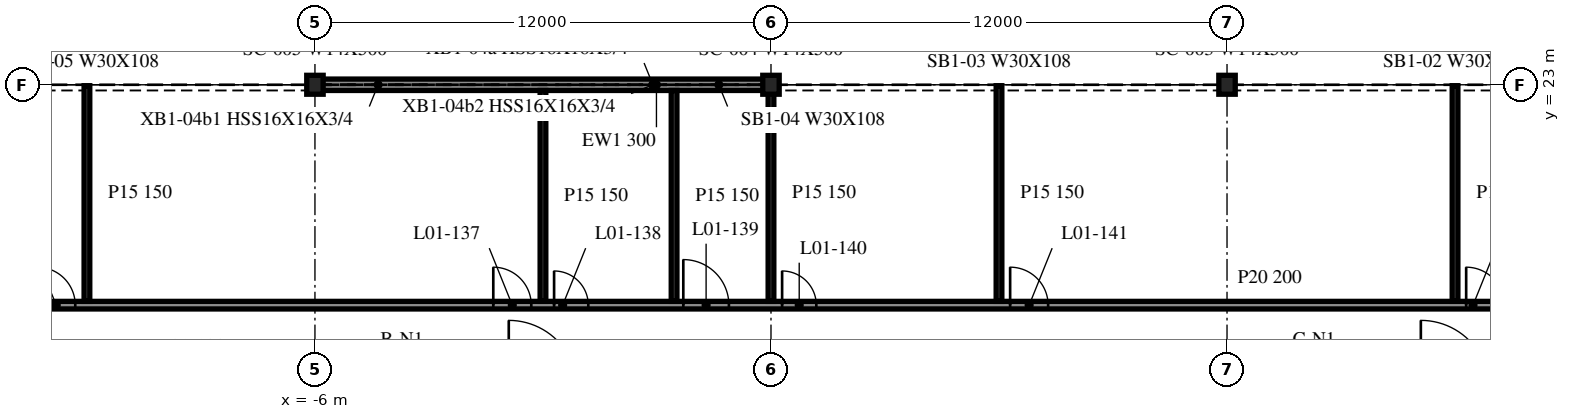
"""IFC4 building model, lengths in metres.
Left out: names, types, materials, properties, quantities, classifications, styles, units other than length and angle.
Written with IfcOpenShell. Run it as: python <this file> out.ifc"""

import sys

from ifc_helpers import new_model, si_unit, direction, frame, frame_2d, origin, origin_2d, place, context, subcontext, project, spatial, rectangle, i_section, extrude, element, fill, save


model = new_model("IFC4")
c1 = context("Model", 3, precision=1e-05, world=origin(), true_north=direction((0.0, 1.0)))
c2 = subcontext(c1, "Body", "Model", "MODEL_VIEW")
j1 = project(units=[si_unit("LENGTHUNIT", "METRE"), si_unit("PLANEANGLEUNIT", "RADIAN")], contexts=[c1])
p1 = place(None, origin())
s1 = spatial("IfcSite", under=j1, at=p1, CompositionType="ELEMENT")
p2 = place(p1, origin())
s2 = spatial("IfcBuilding", under=s1, at=p2, CompositionType="ELEMENT")
p3 = place(p2, frame((0.0, 0.0, 7.2)))
s3 = spatial("IfcBuildingStorey", under=s2, at=p3, CompositionType="ELEMENT", Elevation=7.2)
for number, where, z_axis, x_axis in (
    (1, (18.0, 23.0, -0.34), (0.0, 0.0, 1.0), (1.0, 0.0, 0.0)),
    (2, (6.0, 23.0, -0.34), (0.0, 0.0, 1.0), (1.0, 0.0, 0.0)),
    (3, (-6.0, 23.0, -0.34), (0.0, 0.0, 1.0), (1.0, 0.0, 0.0)),
):
    element("IfcColumn", number, at=place(p3, frame(where, z_axis=z_axis, x_axis=x_axis)), inside=s3, PredefinedType="COLUMN", context=c2, shape_type="SweptSolid", body=[
        extrude(i_section(OverallWidth=0.432, OverallDepth=0.498, WebThickness=0.056, FlangeThickness=0.089, at=origin_2d()), origin(), (0.0, 0.0, 1.0), 4.3),
    ])
p4 = place(p3, frame((5.972, 23.0, 0.0), z_axis=(0.0, 0.0, 1.0), x_axis=(-1.0, 0.0, 0.0)))
e4 = element("IfcWall", 4, at=p4, inside=s3, PredefinedType="NOTDEFINED", context=c2, shape_type="SweptSolid", body=[
    extrude(rectangle(XDim=11.944, YDim=0.3, at=frame_2d((5.972, 0.0))), origin(), (0.0, 0.0, 1.0), 3.203),
])
p5 = place(p3, frame((-47.807, 17.2, 0.0), z_axis=(0.0, 0.0, 1.0), x_axis=(1.0, 0.0, 0.0)))
e5 = element("IfcWall", 5, at=p5, inside=s3, PredefinedType="PARTITIONING", context=c2, shape_type="SweptSolid", body=[
    extrude(rectangle(XDim=95.615, YDim=0.2, at=frame_2d((47.807, 0.0))), origin(), (0.0, 0.0, 1.0), 3.96),
])
p6 = place(p5, frame((4.5, 0.0, 0.0)))
e6 = element("IfcOpeningElement", 6, at=p6, cuts=e5, PredefinedType="OPENING", context=c2, shape_type="SweptSolid", body=[
    extrude(rectangle(XDim=1.0, YDim=2.1, at=frame_2d((0.5, 1.05))), frame((0.0, 0.11, 0.0), z_axis=(0.0, -1.0, 0.0), x_axis=(1.0, 0.0, 0.0)), (0.0, 0.0, 1.0), 0.22),
])
p7 = place(p5, frame((10.9, 0.0, 0.0)))
e7 = element("IfcOpeningElement", 7, at=p7, cuts=e5, PredefinedType="OPENING", context=c2, shape_type="SweptSolid", body=[
    extrude(rectangle(XDim=1.0, YDim=2.1, at=frame_2d((0.5, 1.05))), frame((0.0, 0.11, 0.0), z_axis=(0.0, -1.0, 0.0), x_axis=(1.0, 0.0, 0.0)), (0.0, 0.0, 1.0), 0.22),
])
p8 = place(p5, frame((22.7, 0.0, 0.0)))
e8 = element("IfcOpeningElement", 8, at=p8, cuts=e5, PredefinedType="OPENING", context=c2, shape_type="SweptSolid", body=[
    extrude(rectangle(XDim=0.9, YDim=2.1, at=frame_2d((0.45, 1.05))), frame((0.0, 0.11, 0.0), z_axis=(0.0, -1.0, 0.0), x_axis=(1.0, 0.0, 0.0)), (0.0, 0.0, 1.0), 0.22),
])
p9 = place(p5, frame((25.7, 0.0, 0.0)))
e9 = element("IfcOpeningElement", 9, at=p9, cuts=e5, PredefinedType="OPENING", context=c2, shape_type="SweptSolid", body=[
    extrude(rectangle(XDim=1.2, YDim=2.1, at=frame_2d((0.6, 1.05))), frame((0.0, 0.11, 0.0), z_axis=(0.0, -1.0, 0.0), x_axis=(1.0, 0.0, 0.0)), (0.0, 0.0, 1.0), 0.22),
])
p10 = place(p5, frame((28.7, 0.0, 0.0)))
e10 = element("IfcOpeningElement", 10, at=p10, cuts=e5, PredefinedType="OPENING", context=c2, shape_type="SweptSolid", body=[
    extrude(rectangle(XDim=0.9, YDim=2.1, at=frame_2d((0.45, 1.05))), frame((0.0, 0.11, 0.0), z_axis=(0.0, -1.0, 0.0), x_axis=(1.0, 0.0, 0.0)), (0.0, 0.0, 1.0), 0.22),
])
p11 = place(p5, frame((34.5, 0.0, 0.0)))
e11 = element("IfcOpeningElement", 11, at=p11, cuts=e5, PredefinedType="OPENING", context=c2, shape_type="SweptSolid", body=[
    extrude(rectangle(XDim=1.0, YDim=2.1, at=frame_2d((0.5, 1.05))), frame((0.0, 0.11, 0.0), z_axis=(0.0, -1.0, 0.0), x_axis=(1.0, 0.0, 0.0)), (0.0, 0.0, 1.0), 0.22),
])
p12 = place(p5, frame((46.5, 0.0, 0.0)))
e12 = element("IfcOpeningElement", 12, at=p12, cuts=e5, PredefinedType="OPENING", context=c2, shape_type="SweptSolid", body=[
    extrude(rectangle(XDim=1.0, YDim=2.1, at=frame_2d((0.5, 1.05))), frame((0.0, 0.11, 0.0), z_axis=(0.0, -1.0, 0.0), x_axis=(1.0, 0.0, 0.0)), (0.0, 0.0, 1.0), 0.22),
])
p13 = place(p5, frame((48.1, 0.0, 0.0)))
e13 = element("IfcOpeningElement", 13, at=p13, cuts=e5, PredefinedType="OPENING", context=c2, shape_type="SweptSolid", body=[
    extrude(rectangle(XDim=0.9, YDim=2.1, at=frame_2d((0.45, 1.05))), frame((0.0, 0.11, 0.0), z_axis=(0.0, -1.0, 0.0), x_axis=(1.0, 0.0, 0.0)), (0.0, 0.0, 1.0), 0.22),
])
p14 = place(p5, frame((51.5, 0.0, 0.0)))
e14 = element("IfcOpeningElement", 14, at=p14, cuts=e5, PredefinedType="OPENING", context=c2, shape_type="SweptSolid", body=[
    extrude(rectangle(XDim=1.2, YDim=2.1, at=frame_2d((0.6, 1.05))), frame((0.0, 0.11, 0.0), z_axis=(0.0, -1.0, 0.0), x_axis=(1.0, 0.0, 0.0)), (0.0, 0.0, 1.0), 0.22),
])
p15 = place(p5, frame((54.1, 0.0, 0.0)))
e15 = element("IfcOpeningElement", 15, at=p15, cuts=e5, PredefinedType="OPENING", context=c2, shape_type="SweptSolid", body=[
    extrude(rectangle(XDim=0.9, YDim=2.1, at=frame_2d((0.45, 1.05))), frame((0.0, 0.11, 0.0), z_axis=(0.0, -1.0, 0.0), x_axis=(1.0, 0.0, 0.0)), (0.0, 0.0, 1.0), 0.22),
])
p16 = place(p5, frame((60.1, 0.0, 0.0)))
e16 = element("IfcOpeningElement", 16, at=p16, cuts=e5, PredefinedType="OPENING", context=c2, shape_type="SweptSolid", body=[
    extrude(rectangle(XDim=1.0, YDim=2.1, at=frame_2d((0.5, 1.05))), frame((0.0, 0.11, 0.0), z_axis=(0.0, -1.0, 0.0), x_axis=(1.0, 0.0, 0.0)), (0.0, 0.0, 1.0), 0.22),
])
p17 = place(p5, frame((72.1, 0.0, 0.0)))
e17 = element("IfcOpeningElement", 17, at=p17, cuts=e5, PredefinedType="OPENING", context=c2, shape_type="SweptSolid", body=[
    extrude(rectangle(XDim=1.0, YDim=2.1, at=frame_2d((0.5, 1.05))), frame((0.0, 0.11, 0.0), z_axis=(0.0, -1.0, 0.0), x_axis=(1.0, 0.0, 0.0)), (0.0, 0.0, 1.0), 0.22),
])
p18 = place(p5, frame((75.5, 0.0, 0.0)))
e18 = element("IfcOpeningElement", 18, at=p18, cuts=e5, PredefinedType="OPENING", context=c2, shape_type="SweptSolid", body=[
    extrude(rectangle(XDim=0.9, YDim=2.1, at=frame_2d((0.45, 1.05))), frame((0.0, 0.11, 0.0), z_axis=(0.0, -1.0, 0.0), x_axis=(1.0, 0.0, 0.0)), (0.0, 0.0, 1.0), 0.22),
])
p19 = place(p5, frame((78.1, 0.0, 0.0)))
e19 = element("IfcOpeningElement", 19, at=p19, cuts=e5, PredefinedType="OPENING", context=c2, shape_type="SweptSolid", body=[
    extrude(rectangle(XDim=1.2, YDim=2.1, at=frame_2d((0.6, 1.05))), frame((0.0, 0.11, 0.0), z_axis=(0.0, -1.0, 0.0), x_axis=(1.0, 0.0, 0.0)), (0.0, 0.0, 1.0), 0.22),
])
p20 = place(p5, frame((84.1, 0.0, 0.0)))
e20 = element("IfcOpeningElement", 20, at=p20, cuts=e5, PredefinedType="OPENING", context=c2, shape_type="SweptSolid", body=[
    extrude(rectangle(XDim=0.9, YDim=2.1, at=frame_2d((0.45, 1.05))), frame((0.0, 0.11, 0.0), z_axis=(0.0, -1.0, 0.0), x_axis=(1.0, 0.0, 0.0)), (0.0, 0.0, 1.0), 0.22),
])
p21 = place(p3, frame((-12.0, 17.3, 0.0), z_axis=(0.0, 0.0, 1.0), x_axis=(0.0, 1.0, 0.0)))
e21 = element("IfcWall", 21, at=p21, inside=s3, PredefinedType="PARTITIONING", context=c2, shape_type="SweptSolid", body=[
    extrude(rectangle(XDim=5.675, YDim=0.15, at=frame_2d((2.837, 0.0))), origin(), (0.0, 0.0, 1.0), 3.96),
])
for number, where, z_axis, x_axis in (
    (22, (0.0, 17.3, 0.0), (0.0, 0.0, 1.0), (0.0, 1.0, 0.0)),
    (23, (3.45, 17.3, 0.0), (0.0, 0.0, 1.0), (0.0, 1.0, 0.0)),
):
    element("IfcWall", number, at=place(p3, frame(where, z_axis=z_axis, x_axis=x_axis)), inside=s3, PredefinedType="PARTITIONING", context=c2, shape_type="SweptSolid", body=[
        extrude(rectangle(XDim=5.55, YDim=0.15, at=frame_2d((2.775, 0.0))), origin(), (0.0, 0.0, 1.0), 3.96),
    ])
for number, where, z_axis, x_axis in (
    (24, (6.0, 17.3, 0.0), (0.0, 0.0, 1.0), (0.0, 1.0, 0.0)),
    (25, (12.0, 17.3, 0.0), (0.0, 0.0, 1.0), (0.0, 1.0, 0.0)),
    (26, (24.0, 17.3, 0.0), (0.0, 0.0, 1.0), (0.0, 1.0, 0.0)),
):
    element("IfcWall", number, at=place(p3, frame(where, z_axis=z_axis, x_axis=x_axis)), inside=s3, PredefinedType="PARTITIONING", context=c2, shape_type="SweptSolid", body=[
        extrude(rectangle(XDim=5.675, YDim=0.15, at=frame_2d((2.837, 0.0))), origin(), (0.0, 0.0, 1.0), 3.96),
    ])
p22 = place(p11, origin())
e27 = element("IfcDoor", 27, at=p22, inside=s3, OperationType="SINGLE_SWING_LEFT", PredefinedType="DOOR", context=c2, shape_type="SweptSolid", body=[
    extrude(rectangle(XDim=1.0, YDim=2.1, at=frame_2d((0.5, 1.05))), frame((0.0, 0.025, 0.0), z_axis=(0.0, -1.0, 0.0), x_axis=(1.0, 0.0, 0.0)), (0.0, 0.0, 1.0), 0.05),
])
fill(e11, e27)
p23 = place(p12, origin())
e28 = element("IfcDoor", 28, at=p23, inside=s3, OperationType="SINGLE_SWING_LEFT", PredefinedType="DOOR", context=c2, shape_type="SweptSolid", body=[
    extrude(rectangle(XDim=1.0, YDim=2.1, at=frame_2d((0.5, 1.05))), frame((0.0, 0.025, 0.0), z_axis=(0.0, -1.0, 0.0), x_axis=(1.0, 0.0, 0.0)), (0.0, 0.0, 1.0), 0.05),
])
fill(e12, e28)
p24 = place(p13, origin())
e29 = element("IfcDoor", 29, at=p24, inside=s3, OperationType="SINGLE_SWING_RIGHT", PredefinedType="DOOR", context=c2, shape_type="SweptSolid", body=[
    extrude(rectangle(XDim=0.9, YDim=2.1, at=frame_2d((0.45, 1.05))), frame((0.0, 0.025, 0.0), z_axis=(0.0, -1.0, 0.0), x_axis=(1.0, 0.0, 0.0)), (0.0, 0.0, 1.0), 0.05),
])
fill(e13, e29)
p25 = place(p14, origin())
e30 = element("IfcDoor", 30, at=p25, inside=s3, OperationType="SINGLE_SWING_RIGHT", PredefinedType="DOOR", context=c2, shape_type="SweptSolid", body=[
    extrude(rectangle(XDim=1.2, YDim=2.1, at=frame_2d((0.6, 1.05))), frame((0.0, 0.025, 0.0), z_axis=(0.0, -1.0, 0.0), x_axis=(1.0, 0.0, 0.0)), (0.0, 0.0, 1.0), 0.05),
])
fill(e14, e30)
p26 = place(p15, origin())
e31 = element("IfcDoor", 31, at=p26, inside=s3, OperationType="SINGLE_SWING_RIGHT", PredefinedType="DOOR", context=c2, shape_type="SweptSolid", body=[
    extrude(rectangle(XDim=0.9, YDim=2.1, at=frame_2d((0.45, 1.05))), frame((0.0, 0.025, 0.0), z_axis=(0.0, -1.0, 0.0), x_axis=(1.0, 0.0, 0.0)), (0.0, 0.0, 1.0), 0.05),
])
fill(e15, e31)
p27 = place(p16, origin())
e32 = element("IfcDoor", 32, at=p27, inside=s3, OperationType="SINGLE_SWING_RIGHT", PredefinedType="DOOR", context=c2, shape_type="SweptSolid", body=[
    extrude(rectangle(XDim=1.0, YDim=2.1, at=frame_2d((0.5, 1.05))), frame((0.0, 0.025, 0.0), z_axis=(0.0, -1.0, 0.0), x_axis=(1.0, 0.0, 0.0)), (0.0, 0.0, 1.0), 0.05),
])
fill(e16, e32)
p28 = place(p17, origin())
e33 = element("IfcDoor", 33, at=p28, inside=s3, OperationType="SINGLE_SWING_RIGHT", PredefinedType="DOOR", context=c2, shape_type="SweptSolid", body=[
    extrude(rectangle(XDim=1.0, YDim=2.1, at=frame_2d((0.5, 1.05))), frame((0.0, 0.025, 0.0), z_axis=(0.0, -1.0, 0.0), x_axis=(1.0, 0.0, 0.0)), (0.0, 0.0, 1.0), 0.05),
])
fill(e17, e33)
save(model, sys.argv[1])
